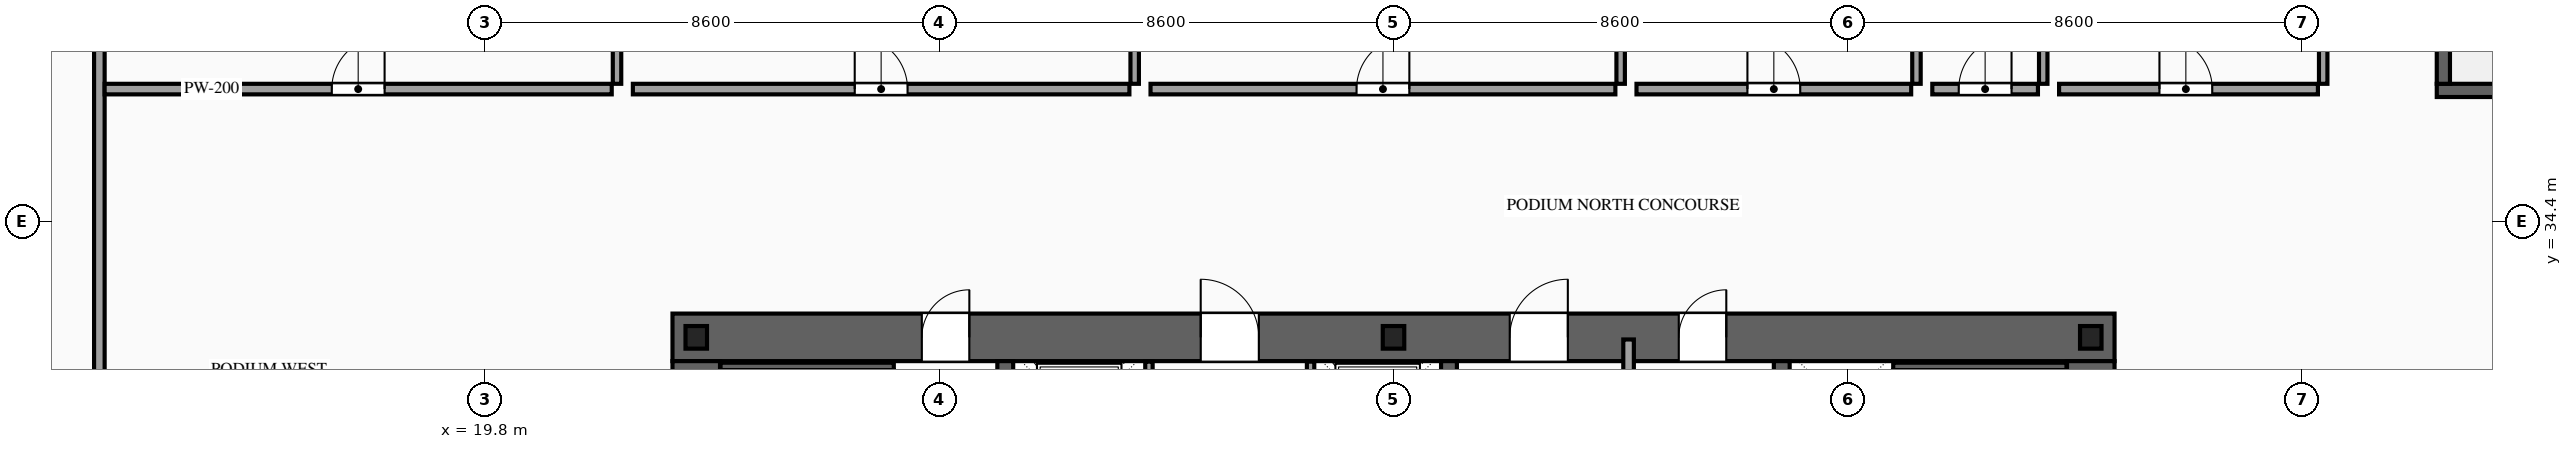
"""IFC4 building model, lengths in metres.
Left out: names, types, materials, properties, quantities, classifications, styles, units other than length and angle.
Written with IfcOpenShell. Run it as: python <this file> out.ifc"""

import sys

from ifc_helpers import new_model, si_unit, direction, frame, frame_2d, origin, origin_2d, place, context, subcontext, project, spatial, rectangle, i_section, extrude, source, transform, mapped, element, fill, save


model = new_model("IFC4")
c1 = context("Model", 3, precision=1e-05, world=origin(), true_north=direction((0.0, 1.0)))
c2 = subcontext(c1, "Body", "Model", "MODEL_VIEW")
j1 = project(units=[si_unit("LENGTHUNIT", "METRE"), si_unit("PLANEANGLEUNIT", "RADIAN")], contexts=[c1])
p1 = place(None, origin())
s1 = spatial("IfcSite", under=j1, at=p1, CompositionType="ELEMENT")
p2 = place(p1, origin())
s2 = spatial("IfcBuilding", under=s1, at=p2, CompositionType="ELEMENT")
p3 = place(p2, frame((0.0, 0.0, 15.0)))
s3 = spatial("IfcBuildingStorey", under=s2, at=p3, CompositionType="ELEMENT", Elevation=15.0)
p4 = place(p3, frame((23.35, 32.2, 0.0), z_axis=(0.0, 0.0, 1.0), x_axis=(1.0, 0.0, 0.0)))
e1 = element("IfcWall", 1, at=p4, inside=s3, PredefinedType="SHEAR", context=c2, shape_type="SweptSolid", body=[
    extrude(rectangle(XDim=27.3, YDim=0.9, at=frame_2d((13.65, 0.0))), origin(), (0.0, 0.0, 1.0), 4.8),
])
p5 = place(p4, frame((4.72, 0.0, 0.0)))
e2 = element("IfcOpeningElement", 2, at=p5, cuts=e1, PredefinedType="OPENING", context=c2, shape_type="SweptSolid", body=[
    extrude(rectangle(XDim=0.9, YDim=2.15, at=frame_2d((0.45, 1.075))), frame((0.0, 0.465, 0.0), z_axis=(0.0, -1.0, 0.0), x_axis=(1.0, 0.0, 0.0)), (0.0, 0.0, 1.0), 0.93),
])
p6 = place(p4, frame((10.0, 0.0, 0.0)))
e3 = element("IfcOpeningElement", 3, at=p6, cuts=e1, PredefinedType="OPENING", context=c2, shape_type="SweptSolid", body=[
    extrude(rectangle(XDim=1.1, YDim=2.2, at=frame_2d((0.55, 1.1))), frame((0.0, 0.465, 0.0), z_axis=(0.0, -1.0, 0.0), x_axis=(1.0, 0.0, 0.0)), (0.0, 0.0, 1.0), 0.93),
])
p7 = place(p4, frame((15.85, 0.0, 0.0)))
e4 = element("IfcOpeningElement", 4, at=p7, cuts=e1, PredefinedType="OPENING", context=c2, shape_type="SweptSolid", body=[
    extrude(rectangle(XDim=1.1, YDim=2.2, at=frame_2d((0.55, 1.1))), frame((0.0, 0.465, 0.0), z_axis=(0.0, -1.0, 0.0), x_axis=(1.0, 0.0, 0.0)), (0.0, 0.0, 1.0), 0.93),
])
p8 = place(p4, frame((19.05, 0.0, 0.0)))
e5 = element("IfcOpeningElement", 5, at=p8, cuts=e1, PredefinedType="OPENING", context=c2, shape_type="SweptSolid", body=[
    extrude(rectangle(XDim=0.9, YDim=2.15, at=frame_2d((0.45, 1.075))), frame((0.0, 0.465, 0.0), z_axis=(0.0, -1.0, 0.0), x_axis=(1.0, 0.0, 0.0)), (0.0, 0.0, 1.0), 0.93),
])
m1 = source(origin(), c2, "Body", "SweptSolid", [
    extrude(rectangle(XDim=11.9, YDim=0.9, at=frame_2d((5.95, 0.0))), origin(), (0.0, 0.0, 1.0), 4.8),
])
for number, where, z_axis, x_axis in (
    (6, (23.8, 19.85, 0.0), (0.0, 0.0, 1.0), (0.0, 1.0, 0.0)),
    (7, (50.2, 19.85, 0.0), (0.0, 0.0, 1.0), (0.0, 1.0, 0.0)),
):
    element("IfcWall", number, at=place(p3, frame(where, z_axis=z_axis, x_axis=x_axis)), inside=s3, PredefinedType="SHEAR", context=c2, shape_type="MappedRepresentation", body=[
        mapped(m1, transform((0.0, 0.0, 0.0), scale=1.0)),
    ])
m2 = source(origin(), c2, "Body", "SweptSolid", [
    extrude(rectangle(XDim=11.9, YDim=0.3, at=frame_2d((5.95, 0.0))), origin(), (0.0, 0.0, 1.0), 4.8),
])
for number, where, z_axis, x_axis in (
    (8, (29.65, 19.85, 0.0), (0.0, 0.0, 1.0), (0.0, 1.0, 0.0)),
    (9, (38.05, 19.85, 0.0), (0.0, 0.0, 1.0), (0.0, 1.0, 0.0)),
    (10, (44.35, 19.85, 0.0), (0.0, 0.0, 1.0), (0.0, 1.0, 0.0)),
):
    element("IfcWall", number, at=place(p3, frame(where, z_axis=z_axis, x_axis=x_axis)), inside=s3, PredefinedType="SOLIDWALL", context=c2, shape_type="MappedRepresentation", body=[
        mapped(m2, transform((0.0, 0.0, 0.0), scale=1.0)),
    ])
m3 = source(origin(), c2, "Body", "SweptSolid", [
    extrude(i_section(OverallWidth=0.407, OverallDepth=0.428, WebThickness=0.02, FlangeThickness=0.035, at=origin_2d()), origin(), (0.0, 0.0, 1.0), 4.8),
])
for number, where, z_axis, x_axis in (
    (11, (23.8, 32.2, 0.0), (0.0, 0.0, 1.0), (1.0, 0.0, 0.0)),
    (12, (37.0, 32.2, 0.0), (0.0, 0.0, 1.0), (1.0, 0.0, 0.0)),
    (13, (50.2, 32.2, 0.0), (0.0, 0.0, 1.0), (1.0, 0.0, 0.0)),
):
    element("IfcColumn", number, at=place(p3, frame(where, z_axis=z_axis, x_axis=x_axis)), inside=s3, PredefinedType="COLUMN", context=c2, shape_type="MappedRepresentation", body=[
        mapped(m3, transform((0.0, 0.0, 0.0), scale=1.0)),
    ])
p9 = place(p3, frame((32.37, 29.4, 0.0), z_axis=(0.0, 0.0, 1.0), x_axis=(0.0, 1.0, 0.0)))
e14 = element("IfcWall", 14, at=p9, inside=s3, PredefinedType="SOLIDWALL", context=c2, shape_type="SweptSolid", body=[
    extrude(rectangle(XDim=2.34, YDim=0.14, at=frame_2d((1.17, 0.0))), origin(), (0.0, 0.0, 1.0), 4.52),
])
p10 = place(p9, frame((0.62, 0.0, 0.0)))
e15 = element("IfcOpeningElement", 15, at=p10, cuts=e14, PredefinedType="OPENING", context=c2, shape_type="SweptSolid", body=[
    extrude(rectangle(XDim=1.1, YDim=2.2, at=frame_2d((0.55, 1.1))), frame((0.0, 0.085, 0.0), z_axis=(0.0, -1.0, 0.0), x_axis=(1.0, 0.0, 0.0)), (0.0, 0.0, 1.0), 0.17),
])
p11 = place(p3, frame((35.43, 29.4, 0.0), z_axis=(0.0, 0.0, 1.0), x_axis=(0.0, 1.0, 0.0)))
e16 = element("IfcWall", 16, at=p11, inside=s3, PredefinedType="SOLIDWALL", context=c2, shape_type="SweptSolid", body=[
    extrude(rectangle(XDim=2.34, YDim=0.14, at=frame_2d((1.17, 0.0))), origin(), (0.0, 0.0, 1.0), 4.52),
])
p12 = place(p11, frame((0.62, 0.0, 0.0)))
e17 = element("IfcOpeningElement", 17, at=p12, cuts=e16, PredefinedType="OPENING", context=c2, shape_type="SweptSolid", body=[
    extrude(rectangle(XDim=1.1, YDim=2.2, at=frame_2d((0.55, 1.1))), frame((0.0, 0.085, 0.0), z_axis=(0.0, -1.0, 0.0), x_axis=(1.0, 0.0, 0.0)), (0.0, 0.0, 1.0), 0.17),
])
m4 = source(origin(), c2, "Body", "SweptSolid", [
    extrude(rectangle(XDim=3.28, YDim=0.14, at=frame_2d((1.64, 0.0))), origin(), (0.0, 0.0, 1.0), 4.52),
])
for number, where, z_axis, x_axis in (
    (18, (24.26, 31.65, 0.0), (0.0, 0.0, 1.0), (1.0, 0.0, 0.0)),
    (19, (46.46, 31.65, 0.0), (0.0, 0.0, 1.0), (1.0, 0.0, 0.0)),
):
    element("IfcWall", number, at=place(p3, frame(where, z_axis=z_axis, x_axis=x_axis)), inside=s3, PredefinedType="SOLIDWALL", context=c2, shape_type="MappedRepresentation", body=[
        mapped(m4, transform((0.0, 0.0, 0.0), scale=1.0)),
    ])
m5 = source(origin(), c2, "Body", "SweptSolid", [
    extrude(rectangle(XDim=4.3, YDim=0.25, at=frame_2d((2.15, 0.0))), origin(), (0.0, 0.0, 1.0), 4.52),
])
p13 = place(p3, frame((56.75, 36.875, 0.0), z_axis=(0.0, 0.0, 1.0), x_axis=(1.0, 0.0, 0.0)))
e20 = element("IfcWall", 20, at=p13, inside=s3, PredefinedType="SOLIDWALL", context=c2, shape_type="MappedRepresentation", body=[
    mapped(m5, transform((0.0, 0.0, 0.0), scale=1.0)),
])
p14 = place(p3, frame((56.875, 37.0, 0.0), z_axis=(0.0, 0.0, 1.0), x_axis=(0.0, 1.0, 0.0)))
e21 = element("IfcWall", 21, at=p14, inside=s3, PredefinedType="SOLIDWALL", context=c2, shape_type="SweptSolid", body=[
    extrude(rectangle(XDim=9.6, YDim=0.25, at=frame_2d((4.8, 0.0))), origin(), (0.0, 0.0, 1.0), 4.52),
])
p15 = place(p14, frame((8.15, 0.0, 0.0)))
e22 = element("IfcOpeningElement", 22, at=p15, cuts=e21, PredefinedType="OPENING", context=c2, shape_type="SweptSolid", body=[
    extrude(rectangle(XDim=1.1, YDim=2.2, at=frame_2d((0.55, 1.1))), frame((0.0, 0.14, 0.0), z_axis=(0.0, -1.0, 0.0), x_axis=(1.0, 0.0, 0.0)), (0.0, 0.0, 1.0), 0.28),
])
m6 = source(origin(), c2, "Body", "SweptSolid", [
    extrude(rectangle(XDim=5.96, YDim=0.2, at=frame_2d((2.98, 0.0))), origin(), (0.0, 0.0, 1.0), 4.52),
])
p16 = place(p3, frame((41.45, 26.2, 0.0), z_axis=(0.0, 0.0, 1.0), x_axis=(0.0, 1.0, 0.0)))
e23 = element("IfcWall", 23, at=p16, inside=s3, PredefinedType="PARTITIONING", context=c2, shape_type="MappedRepresentation", body=[
    mapped(m6, transform((0.0, 0.0, 0.0), scale=1.0)),
])
p17 = place(p3, frame((12.5, 24.8, 0.0), z_axis=(0.0, 0.0, 1.0), x_axis=(0.0, 1.0, 0.0)))
e24 = element("IfcWall", 24, at=p17, inside=s3, PredefinedType="PARTITIONING", context=c2, shape_type="SweptSolid", body=[
    extrude(rectangle(XDim=24.82, YDim=0.2, at=frame_2d((12.41, 0.0))), origin(), (0.0, 0.0, 1.0), 4.52),
])
p18 = place(p17, frame((4.9, 0.0, 0.0)))
e25 = element("IfcOpeningElement", 25, at=p18, cuts=e24, PredefinedType="OPENING", context=c2, shape_type="SweptSolid", body=[
    extrude(rectangle(XDim=1.0, YDim=2.2, at=frame_2d((0.5, 1.1))), frame((0.0, 0.115, 0.0), z_axis=(0.0, -1.0, 0.0), x_axis=(1.0, 0.0, 0.0)), (0.0, 0.0, 1.0), 0.23),
])
p19 = place(p3, frame((12.6, 36.9, 0.0), z_axis=(0.0, 0.0, 1.0), x_axis=(1.0, 0.0, 0.0)))
e26 = element("IfcWall", 26, at=p19, inside=s3, PredefinedType="PARTITIONING", context=c2, shape_type="SweptSolid", body=[
    extrude(rectangle(XDim=9.6, YDim=0.2, at=frame_2d((4.8, 0.0))), origin(), (0.0, 0.0, 1.0), 4.52),
])
p20 = place(p19, frame((4.3, 0.0, 0.0)))
e27 = element("IfcOpeningElement", 27, at=p20, cuts=e26, PredefinedType="OPENING", context=c2, shape_type="SweptSolid", body=[
    extrude(rectangle(XDim=1.0, YDim=2.2, at=frame_2d((0.5, 1.1))), frame((0.0, 0.115, 0.0), z_axis=(0.0, -1.0, 0.0), x_axis=(1.0, 0.0, 0.0)), (0.0, 0.0, 1.0), 0.23),
])
m7 = source(origin(), c2, "Body", "SweptSolid", [
    extrude(rectangle(XDim=12.62, YDim=0.16, at=frame_2d((6.31, 0.0))), origin(), (0.0, 0.0, 1.0), 4.52),
])
p21 = place(p3, frame((22.3, 37.0, 0.0), z_axis=(0.0, 0.0, 1.0), x_axis=(0.0, 1.0, 0.0)))
e28 = element("IfcWall", 28, at=p21, inside=s3, PredefinedType="PARTITIONING", context=c2, shape_type="MappedRepresentation", body=[
    mapped(m7, transform((0.0, 0.0, 0.0), scale=1.0)),
])
p22 = place(p3, frame((22.6, 36.9, 0.0), z_axis=(0.0, 0.0, 1.0), x_axis=(1.0, 0.0, 0.0)))
e29 = element("IfcWall", 29, at=p22, inside=s3, PredefinedType="PARTITIONING", context=c2, shape_type="SweptSolid", body=[
    extrude(rectangle(XDim=9.4, YDim=0.2, at=frame_2d((4.7, 0.0))), origin(), (0.0, 0.0, 1.0), 4.52),
])
p23 = place(p22, frame((4.2, 0.0, 0.0)))
e30 = element("IfcOpeningElement", 30, at=p23, cuts=e29, PredefinedType="OPENING", context=c2, shape_type="SweptSolid", body=[
    extrude(rectangle(XDim=1.0, YDim=2.2, at=frame_2d((0.5, 1.1))), frame((0.0, 0.115, 0.0), z_axis=(0.0, -1.0, 0.0), x_axis=(1.0, 0.0, 0.0)), (0.0, 0.0, 1.0), 0.23),
])
p24 = place(p3, frame((32.1, 37.0, 0.0), z_axis=(0.0, 0.0, 1.0), x_axis=(0.0, 1.0, 0.0)))
e31 = element("IfcWall", 31, at=p24, inside=s3, PredefinedType="PARTITIONING", context=c2, shape_type="MappedRepresentation", body=[
    mapped(m7, transform((0.0, 0.0, 0.0), scale=1.0)),
])
p25 = place(p3, frame((32.4, 36.9, 0.0), z_axis=(0.0, 0.0, 1.0), x_axis=(1.0, 0.0, 0.0)))
e32 = element("IfcWall", 32, at=p25, inside=s3, PredefinedType="PARTITIONING", context=c2, shape_type="SweptSolid", body=[
    extrude(rectangle(XDim=8.8, YDim=0.2, at=frame_2d((4.4, 0.0))), origin(), (0.0, 0.0, 1.0), 4.52),
])
p26 = place(p25, frame((3.9, 0.0, 0.0)))
e33 = element("IfcOpeningElement", 33, at=p26, cuts=e32, PredefinedType="OPENING", context=c2, shape_type="SweptSolid", body=[
    extrude(rectangle(XDim=1.0, YDim=2.2, at=frame_2d((0.5, 1.1))), frame((0.0, 0.115, 0.0), z_axis=(0.0, -1.0, 0.0), x_axis=(1.0, 0.0, 0.0)), (0.0, 0.0, 1.0), 0.23),
])
p27 = place(p3, frame((41.3, 37.0, 0.0), z_axis=(0.0, 0.0, 1.0), x_axis=(0.0, 1.0, 0.0)))
e34 = element("IfcWall", 34, at=p27, inside=s3, PredefinedType="PARTITIONING", context=c2, shape_type="MappedRepresentation", body=[
    mapped(m7, transform((0.0, 0.0, 0.0), scale=1.0)),
])
p28 = place(p3, frame((41.6, 36.9, 0.0), z_axis=(0.0, 0.0, 1.0), x_axis=(1.0, 0.0, 0.0)))
e35 = element("IfcWall", 35, at=p28, inside=s3, PredefinedType="PARTITIONING", context=c2, shape_type="SweptSolid", body=[
    extrude(rectangle(XDim=5.2, YDim=0.2, at=frame_2d((2.6, 0.0))), origin(), (0.0, 0.0, 1.0), 4.52),
])
p29 = place(p28, frame((2.1, 0.0, 0.0)))
e36 = element("IfcOpeningElement", 36, at=p29, cuts=e35, PredefinedType="OPENING", context=c2, shape_type="SweptSolid", body=[
    extrude(rectangle(XDim=1.0, YDim=2.2, at=frame_2d((0.5, 1.1))), frame((0.0, 0.115, 0.0), z_axis=(0.0, -1.0, 0.0), x_axis=(1.0, 0.0, 0.0)), (0.0, 0.0, 1.0), 0.23),
])
p30 = place(p3, frame((46.9, 37.0, 0.0), z_axis=(0.0, 0.0, 1.0), x_axis=(0.0, 1.0, 0.0)))
e37 = element("IfcWall", 37, at=p30, inside=s3, PredefinedType="PARTITIONING", context=c2, shape_type="MappedRepresentation", body=[
    mapped(m7, transform((0.0, 0.0, 0.0), scale=1.0)),
])
p31 = place(p3, frame((47.2, 36.9, 0.0), z_axis=(0.0, 0.0, 1.0), x_axis=(1.0, 0.0, 0.0)))
e38 = element("IfcWall", 38, at=p31, inside=s3, PredefinedType="PARTITIONING", context=c2, shape_type="SweptSolid", body=[
    extrude(rectangle(XDim=2.0, YDim=0.2, at=frame_2d((1.0, 0.0))), origin(), (0.0, 0.0, 1.0), 4.52),
])
p32 = place(p31, frame((0.5, 0.0, 0.0)))
e39 = element("IfcOpeningElement", 39, at=p32, cuts=e38, PredefinedType="OPENING", context=c2, shape_type="SweptSolid", body=[
    extrude(rectangle(XDim=1.0, YDim=2.2, at=frame_2d((0.5, 1.1))), frame((0.0, 0.115, 0.0), z_axis=(0.0, -1.0, 0.0), x_axis=(1.0, 0.0, 0.0)), (0.0, 0.0, 1.0), 0.23),
])
p33 = place(p3, frame((49.3, 37.0, 0.0), z_axis=(0.0, 0.0, 1.0), x_axis=(0.0, 1.0, 0.0)))
e40 = element("IfcWall", 40, at=p33, inside=s3, PredefinedType="PARTITIONING", context=c2, shape_type="MappedRepresentation", body=[
    mapped(m7, transform((0.0, 0.0, 0.0), scale=1.0)),
])
p34 = place(p3, frame((49.6, 36.9, 0.0), z_axis=(0.0, 0.0, 1.0), x_axis=(1.0, 0.0, 0.0)))
e41 = element("IfcWall", 41, at=p34, inside=s3, PredefinedType="PARTITIONING", context=c2, shape_type="SweptSolid", body=[
    extrude(rectangle(XDim=4.9, YDim=0.2, at=frame_2d((2.45, 0.0))), origin(), (0.0, 0.0, 1.0), 4.52),
])
p35 = place(p34, frame((1.9, 0.0, 0.0)))
e42 = element("IfcOpeningElement", 42, at=p35, cuts=e41, PredefinedType="OPENING", context=c2, shape_type="SweptSolid", body=[
    extrude(rectangle(XDim=1.0, YDim=2.2, at=frame_2d((0.5, 1.1))), frame((0.0, 0.115, 0.0), z_axis=(0.0, -1.0, 0.0), x_axis=(1.0, 0.0, 0.0)), (0.0, 0.0, 1.0), 0.23),
])
p36 = place(p3, frame((54.6, 37.0, 0.0), z_axis=(0.0, 0.0, 1.0), x_axis=(0.0, 1.0, 0.0)))
e43 = element("IfcWall", 43, at=p36, inside=s3, PredefinedType="PARTITIONING", context=c2, shape_type="MappedRepresentation", body=[
    mapped(m7, transform((0.0, 0.0, 0.0), scale=1.0)),
])
m8 = source(origin(), c2, "Body", "SweptSolid", [
    extrude(rectangle(XDim=0.9, YDim=2.15, at=frame_2d((0.45, 1.075))), frame((0.0, 0.025, 0.0), z_axis=(0.0, -1.0, 0.0), x_axis=(1.0, 0.0, 0.0)), (0.0, 0.0, 1.0), 0.05),
])
p37 = place(p5, origin())
e44 = element("IfcDoor", 44, at=p37, inside=s3, OperationType="SINGLE_SWING_RIGHT", PredefinedType="DOOR", context=c2, shape_type="MappedRepresentation", body=[
    mapped(m8, transform((0.0, 0.0, 0.0), scale=1.0)),
])
fill(e2, e44)
m9 = source(origin(), c2, "Body", "SweptSolid", [
    extrude(rectangle(XDim=1.1, YDim=2.2, at=frame_2d((0.55, 1.1))), frame((0.0, 0.025, 0.0), z_axis=(0.0, -1.0, 0.0), x_axis=(1.0, 0.0, 0.0)), (0.0, 0.0, 1.0), 0.05),
])
p38 = place(p6, origin())
e45 = element("IfcDoor", 45, at=p38, inside=s3, OperationType="SINGLE_SWING_LEFT", PredefinedType="DOOR", context=c2, shape_type="MappedRepresentation", body=[
    mapped(m9, transform((0.0, 0.0, 0.0), scale=1.0)),
])
fill(e3, e45)
p39 = place(p7, origin())
e46 = element("IfcDoor", 46, at=p39, inside=s3, OperationType="SINGLE_SWING_RIGHT", PredefinedType="DOOR", context=c2, shape_type="MappedRepresentation", body=[
    mapped(m9, transform((0.0, 0.0, 0.0), scale=1.0)),
])
fill(e4, e46)
p40 = place(p8, origin())
e47 = element("IfcDoor", 47, at=p40, inside=s3, OperationType="SINGLE_SWING_RIGHT", PredefinedType="DOOR", context=c2, shape_type="MappedRepresentation", body=[
    mapped(m8, transform((0.0, 0.0, 0.0), scale=1.0)),
])
fill(e5, e47)
m10 = source(origin(), c2, "Body", "SweptSolid", [
    extrude(rectangle(XDim=1.0, YDim=2.2, at=frame_2d((0.5, 1.1))), frame((0.0, 0.025, 0.0), z_axis=(0.0, -1.0, 0.0), x_axis=(1.0, 0.0, 0.0)), (0.0, 0.0, 1.0), 0.05),
])
p41 = place(p20, origin())
e48 = element("IfcDoor", 48, at=p41, inside=s3, OperationType="SINGLE_SWING_RIGHT", PredefinedType="DOOR", context=c2, shape_type="MappedRepresentation", body=[
    mapped(m10, transform((0.0, 0.0, 0.0), scale=1.0)),
])
fill(e27, e48)
p42 = place(p23, origin())
e49 = element("IfcDoor", 49, at=p42, inside=s3, OperationType="SINGLE_SWING_LEFT", PredefinedType="DOOR", context=c2, shape_type="MappedRepresentation", body=[
    mapped(m10, transform((0.0, 0.0, 0.0), scale=1.0)),
])
fill(e30, e49)
p43 = place(p26, origin())
e50 = element("IfcDoor", 50, at=p43, inside=s3, OperationType="SINGLE_SWING_RIGHT", PredefinedType="DOOR", context=c2, shape_type="MappedRepresentation", body=[
    mapped(m10, transform((0.0, 0.0, 0.0), scale=1.0)),
])
fill(e33, e50)
p44 = place(p29, origin())
e51 = element("IfcDoor", 51, at=p44, inside=s3, OperationType="SINGLE_SWING_LEFT", PredefinedType="DOOR", context=c2, shape_type="MappedRepresentation", body=[
    mapped(m10, transform((0.0, 0.0, 0.0), scale=1.0)),
])
fill(e36, e51)
p45 = place(p32, origin())
e52 = element("IfcDoor", 52, at=p45, inside=s3, OperationType="SINGLE_SWING_RIGHT", PredefinedType="DOOR", context=c2, shape_type="MappedRepresentation", body=[
    mapped(m10, transform((0.0, 0.0, 0.0), scale=1.0)),
])
fill(e39, e52)
p46 = place(p35, origin())
e53 = element("IfcDoor", 53, at=p46, inside=s3, OperationType="SINGLE_SWING_LEFT", PredefinedType="DOOR", context=c2, shape_type="MappedRepresentation", body=[
    mapped(m10, transform((0.0, 0.0, 0.0), scale=1.0)),
])
fill(e42, e53)
save(model, sys.argv[1])
